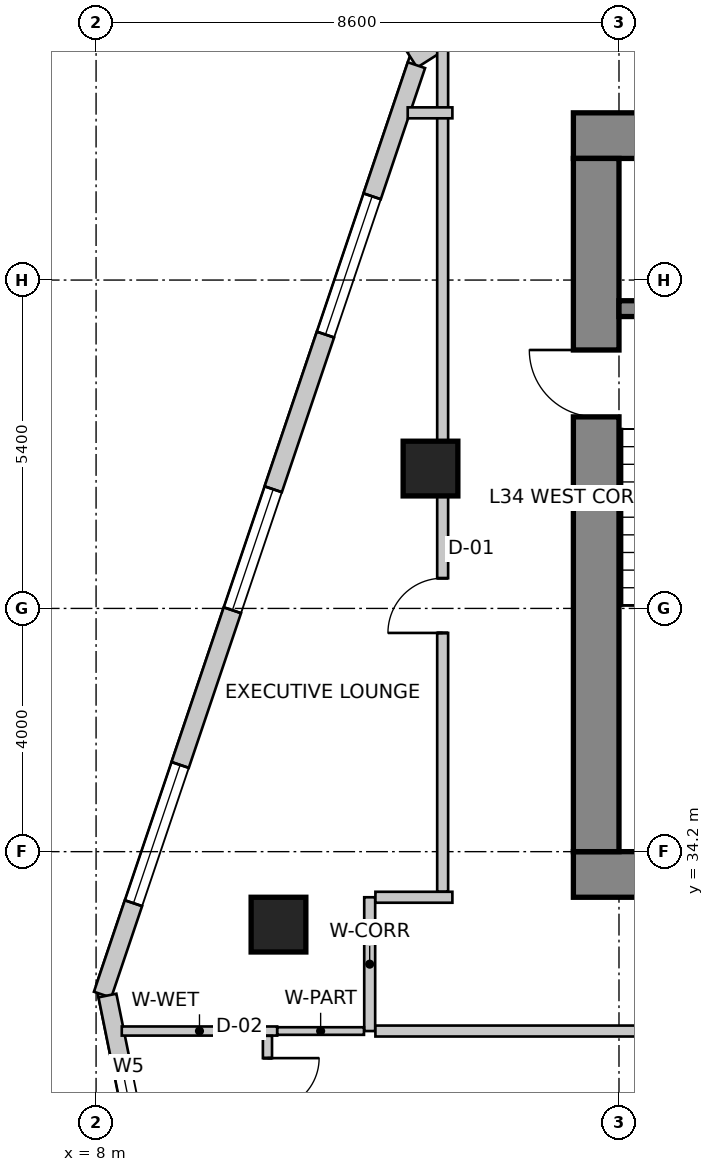
"""IFC4 building model, lengths in metres.
Left out: names, types, materials, properties, quantities, classifications, styles, units other than length and angle.
Written with IfcOpenShell. Run it as: python <this file> out.ifc"""

import sys

from ifc_helpers import new_model, si_unit, direction, frame, frame_2d, origin, origin_2d, place, context, subcontext, project, spatial, rectangle, extrude, source, transform, mapped, element, fill, save


model = new_model("IFC4")
c1 = context("Model", 3, precision=1e-05, world=origin(), true_north=direction((0.0, 1.0)))
c2 = subcontext(c1, "Body", "Model", "MODEL_VIEW")
j1 = project(units=[si_unit("LENGTHUNIT", "METRE"), si_unit("PLANEANGLEUNIT", "RADIAN")], contexts=[c1])
p1 = place(None, origin())
s1 = spatial("IfcSite", under=j1, at=p1, CompositionType="ELEMENT")
p2 = place(p1, origin())
s2 = spatial("IfcBuilding", under=s1, at=p2, CompositionType="ELEMENT")
p3 = place(p2, frame((0.0, 0.0, 139.4)))
s3 = spatial("IfcBuildingStorey", under=s2, at=p3, CompositionType="ELEMENT", Elevation=139.4)
p4 = place(p3, frame((15.85, 45.975, 0.0), z_axis=(0.0, 0.0, 1.0), x_axis=(1.0, 0.0, 0.0)))
e1 = element("IfcWall", 1, at=p4, inside=s3, PredefinedType="SHEAR", context=c2, shape_type="SweptSolid", body=[
    extrude(rectangle(XDim=15.9, YDim=0.75, at=frame_2d((7.95, 0.0))), origin(), (0.0, 0.0, 1.0), 3.6),
])
p5 = place(p3, frame((15.85, 33.825, 0.0), z_axis=(0.0, 0.0, 1.0), x_axis=(1.0, 0.0, 0.0)))
e2 = element("IfcWall", 2, at=p5, inside=s3, PredefinedType="SHEAR", context=c2, shape_type="SweptSolid", body=[
    extrude(rectangle(XDim=15.9, YDim=0.75, at=frame_2d((7.95, 0.0))), origin(), (0.0, 0.0, 1.0), 3.6),
])
m1 = source(origin(), c2, "Body", "SweptSolid", [
    extrude(rectangle(XDim=1.3, YDim=2.15, at=frame_2d((0.65, 1.075))), frame((0.0, 0.385, 0.0), z_axis=(0.0, -1.0, 0.0), x_axis=(1.0, 0.0, 0.0)), (0.0, 0.0, 1.0), 0.77),
])
p6 = place(p5, frame((10.08, 0.0, 0.0)))
e3 = element("IfcOpeningElement", 3, at=p6, cuts=e2, PredefinedType="OPENING", context=c2, shape_type="MappedRepresentation", body=[
    mapped(m1, transform((0.0, 0.0, 0.0), scale=1.0)),
])
p7 = place(p3, frame((16.225, 34.2, 0.0), z_axis=(0.0, 0.0, 1.0), x_axis=(0.0, 1.0, 0.0)))
e4 = element("IfcWall", 4, at=p7, inside=s3, PredefinedType="SHEAR", context=c2, shape_type="SweptSolid", body=[
    extrude(rectangle(XDim=11.4, YDim=0.75, at=frame_2d((5.7, 0.0))), origin(), (0.0, 0.0, 1.0), 3.6),
])
m2 = source(origin(), c2, "Body", "SweptSolid", [
    extrude(rectangle(XDim=1.1, YDim=2.15, at=frame_2d((0.55, 1.075))), frame((0.0, 0.385, 0.0), z_axis=(0.0, -1.0, 0.0), x_axis=(1.0, 0.0, 0.0)), (0.0, 0.0, 1.0), 0.77),
])
p8 = place(p7, frame((7.15, 0.0, 0.0)))
e5 = element("IfcOpeningElement", 5, at=p8, cuts=e4, PredefinedType="OPENING", context=c2, shape_type="MappedRepresentation", body=[
    mapped(m2, transform((0.0, 0.0, 0.0), scale=1.0)),
])
p9 = place(p3, frame((16.6, 43.13, 0.0), z_axis=(0.0, 0.0, 1.0), x_axis=(1.0, 0.0, 0.0)))
e6 = element("IfcWall", 6, at=p9, inside=s3, PredefinedType="SHEAR", context=c2, shape_type="SweptSolid", body=[
    extrude(rectangle(XDim=3.5, YDim=0.26, at=frame_2d((1.75, 0.0))), origin(), (0.0, 0.0, 1.0), 3.6),
])
m3 = source(origin(), c2, "Body", "SweptSolid", [
    extrude(rectangle(XDim=0.9, YDim=0.9, at=origin_2d()), origin(), (0.0, 0.0, 1.0), 3.6),
])
for number, where, z_axis, x_axis in (
    (7, (11.0, 33.0, 0.0), (0.0, 0.0, 1.0), (1.0, 0.0, 0.0)),
    (8, (13.5, 40.5, 0.0), (0.0, 0.0, 1.0), (1.0, 0.0, 0.0)),
):
    element("IfcColumn", number, at=place(p3, frame(where, z_axis=z_axis, x_axis=x_axis)), inside=s3, PredefinedType="COLUMN", context=c2, shape_type="MappedRepresentation", body=[
        mapped(m3, transform((0.0, 0.0, 0.0), scale=1.0)),
    ])
p10 = place(p3, frame((21.875, 52.742, 0.0), z_axis=(0.0, 0.0, 1.0), x_axis=(-0.843662465249, -0.536873956092, 0.0)))
e9 = element("IfcWall", 9, at=p10, inside=s3, PredefinedType="SOLIDWALL", context=c2, shape_type="SweptSolid", body=[
    extrude(rectangle(XDim=10.284, YDim=0.3, at=frame_2d((5.142, 0.0))), origin(), (0.0, 0.0, 1.0), 3.35),
])
m4 = source(origin(), c2, "Body", "SweptSolid", [
    extrude(rectangle(XDim=2.1, YDim=2.0, at=frame_2d((1.05, 1.0))), frame((0.0, 0.16, 0.0), z_axis=(0.0, -1.0, 0.0), x_axis=(1.0, 0.0, 0.0)), (0.0, 0.0, 1.0), 0.32),
])
p11 = place(p10, frame((2.806, 0.0, 0.85)))
e10 = element("IfcOpeningElement", 10, at=p11, cuts=e9, PredefinedType="OPENING", context=c2, shape_type="MappedRepresentation", body=[
    mapped(m4, transform((0.0, 0.0, 0.0), scale=1.0)),
])
m5 = source(origin(), c2, "Body", "SweptSolid", [
    extrude(rectangle(XDim=1.2, YDim=1.6, at=frame_2d((0.6, 0.8))), frame((0.0, 0.16, 0.0), z_axis=(0.0, -1.0, 0.0), x_axis=(1.0, 0.0, 0.0)), (0.0, 0.0, 1.0), 0.32),
])
p12 = place(p10, frame((8.087, 0.0, 0.85)))
e11 = element("IfcOpeningElement", 11, at=p12, cuts=e9, PredefinedType="OPENING", context=c2, shape_type="MappedRepresentation", body=[
    mapped(m5, transform((0.0, 0.0, 0.0), scale=1.0)),
])
p13 = place(p3, frame((13.269, 47.134, 0.0), z_axis=(0.0, 0.0, 1.0), x_axis=(-0.319929773322, -0.947441259468, 0.0)))
e12 = element("IfcWall", 12, at=p13, inside=s3, PredefinedType="SOLIDWALL", context=c2, shape_type="SweptSolid", body=[
    extrude(rectangle(XDim=16.134, YDim=0.3, at=frame_2d((8.067, 0.0))), origin(), (0.0, 0.0, 1.0), 3.35),
])
m6 = source(origin(), c2, "Body", "SweptSolid", [
    extrude(rectangle(XDim=2.4, YDim=2.2, at=frame_2d((1.2, 1.1))), frame((0.0, 0.16, 0.0), z_axis=(0.0, -1.0, 0.0), x_axis=(1.0, 0.0, 0.0)), (0.0, 0.0, 1.0), 0.32),
])
p14 = place(p13, frame((2.276, 0.0, 0.85)))
e13 = element("IfcOpeningElement", 13, at=p14, cuts=e12, PredefinedType="OPENING", context=c2, shape_type="MappedRepresentation", body=[
    mapped(m6, transform((0.0, 0.0, 0.0), scale=1.0)),
])
p15 = place(p13, frame((7.361, 0.0, 0.85)))
e14 = element("IfcOpeningElement", 14, at=p15, cuts=e12, PredefinedType="OPENING", context=c2, shape_type="MappedRepresentation", body=[
    mapped(m4, transform((0.0, 0.0, 0.0), scale=1.0)),
])
p16 = place(p13, frame((12.146, 0.0, 0.85)))
e15 = element("IfcOpeningElement", 15, at=p16, cuts=e12, PredefinedType="OPENING", context=c2, shape_type="MappedRepresentation", body=[
    mapped(m6, transform((0.0, 0.0, 0.0), scale=1.0)),
])
p17 = place(p3, frame((8.187, 31.834, 0.0), z_axis=(0.0, 0.0, 1.0), x_axis=(0.198869838988, -0.980025911464, 0.0)))
e16 = element("IfcWall", 16, at=p17, inside=s3, PredefinedType="SOLIDWALL", context=c2, shape_type="SweptSolid", body=[
    extrude(rectangle(XDim=16.363, YDim=0.3, at=frame_2d((8.182, 0.0))), origin(), (0.0, 0.0, 1.0), 3.35),
])
p18 = place(p17, frame((1.131, 0.0, 0.85)))
e17 = element("IfcOpeningElement", 17, at=p18, cuts=e16, PredefinedType="OPENING", context=c2, shape_type="MappedRepresentation", body=[
    mapped(m5, transform((0.0, 0.0, 0.0), scale=1.0)),
])
p19 = place(p17, frame((4.38, 0.0, 0.85)))
e18 = element("IfcOpeningElement", 18, at=p19, cuts=e16, PredefinedType="OPENING", context=c2, shape_type="MappedRepresentation", body=[
    mapped(m4, transform((0.0, 0.0, 0.0), scale=1.0)),
])
p20 = place(p17, frame((8.539, 0.0, 0.85)))
e19 = element("IfcOpeningElement", 19, at=p20, cuts=e16, PredefinedType="OPENING", context=c2, shape_type="MappedRepresentation", body=[
    mapped(m5, transform((0.0, 0.0, 0.0), scale=1.0)),
])
p21 = place(p17, frame((12.212, 0.0, 0.85)))
e20 = element("IfcOpeningElement", 20, at=p21, cuts=e16, PredefinedType="OPENING", context=c2, shape_type="MappedRepresentation", body=[
    mapped(m4, transform((0.0, 0.0, 0.0), scale=1.0)),
])
p22 = place(p3, frame((12.5, 31.25, 0.0), z_axis=(0.0, 0.0, 1.0), x_axis=(0.0, 1.0, 0.0)))
e21 = element("IfcWall", 21, at=p22, inside=s3, PredefinedType="PARTITIONING", context=c2, shape_type="SweptSolid", body=[
    extrude(rectangle(XDim=2.2, YDim=0.18, at=frame_2d((1.1, 0.0))), origin(), (0.0, 0.0, 1.0), 3.019),
])
p23 = place(p3, frame((12.594, 33.45, 0.0), z_axis=(0.0, 0.0, 1.0), x_axis=(1.0, 0.0, 0.0)))
e22 = element("IfcWall", 22, at=p23, inside=s3, PredefinedType="PARTITIONING", context=c2, shape_type="SweptSolid", body=[
    extrude(rectangle(XDim=1.266, YDim=0.18, at=frame_2d((0.633, 0.0))), origin(), (0.0, 0.0, 1.0), 3.35),
])
p24 = place(p3, frame((17.96, 31.25, 0.0), z_axis=(0.0, 0.0, 1.0), x_axis=(-1.0, 0.0, 0.0)))
e23 = element("IfcWall", 23, at=p24, inside=s3, PredefinedType="PARTITIONING", context=c2, shape_type="SweptSolid", body=[
    extrude(rectangle(XDim=5.366, YDim=0.18, at=frame_2d((2.683, 0.0))), origin(), (0.0, 0.0, 1.0), 3.019),
])
p25 = place(p3, frame((13.7, 33.544, 0.0), z_axis=(0.0, 0.0, 1.0), x_axis=(0.0, 1.0, 0.0)))
e24 = element("IfcWall", 24, at=p25, inside=s3, PredefinedType="PARTITIONING", context=c2, shape_type="SweptSolid", body=[
    extrude(rectangle(XDim=13.86, YDim=0.18, at=frame_2d((6.93, 0.0))), origin(), (0.0, 0.0, 1.0), 2.492),
])
m7 = source(origin(), c2, "Body", "SweptSolid", [
    extrude(rectangle(XDim=0.9, YDim=2.15, at=frame_2d((0.45, 1.075))), frame((0.0, 0.1, 0.0), z_axis=(0.0, -1.0, 0.0), x_axis=(1.0, 0.0, 0.0)), (0.0, 0.0, 1.0), 0.2),
])
p26 = place(p25, frame((4.253, 0.0, 0.0)))
e25 = element("IfcOpeningElement", 25, at=p26, cuts=e24, PredefinedType="OPENING", context=c2, shape_type="MappedRepresentation", body=[
    mapped(m7, transform((0.0, 0.0, 0.0), scale=1.0)),
])
p27 = place(p3, frame((13.86, 46.35, 0.0), z_axis=(0.0, 0.0, 1.0), x_axis=(-1.0, 0.0, 0.0)))
e26 = element("IfcWall", 26, at=p27, inside=s3, PredefinedType="PARTITIONING", context=c2, shape_type="SweptSolid", body=[
    extrude(rectangle(XDim=0.735, YDim=0.18, at=frame_2d((0.367, 0.0))), origin(), (0.0, 0.0, 1.0), 3.35),
])
p28 = place(p3, frame((10.979, 31.25, 0.0), z_axis=(0.0, 0.0, 1.0), x_axis=(-1.0, 0.0, 0.0)))
e27 = element("IfcWall", 27, at=p28, inside=s3, PredefinedType="PARTITIONING", context=c2, shape_type="SweptSolid", body=[
    extrude(rectangle(XDim=2.556, YDim=0.15, at=frame_2d((1.278, 0.0))), origin(), (0.0, 0.0, 1.0), 2.492),
])
p29 = place(p3, frame((12.406, 31.25, 0.0), z_axis=(0.0, 0.0, 1.0), x_axis=(-1.0, 0.0, 0.0)))
e28 = element("IfcWall", 28, at=p29, inside=s3, PredefinedType="PARTITIONING", context=c2, shape_type="SweptSolid", body=[
    extrude(rectangle(XDim=1.426, YDim=0.125, at=frame_2d((0.713, 0.0))), origin(), (0.0, 0.0, 1.0), 2.492),
])
p30 = place(p3, frame((10.819, 31.171, 0.0), z_axis=(0.0, 0.0, 1.0), x_axis=(0.0, -1.0, 0.0)))
e29 = element("IfcWall", 29, at=p30, inside=s3, PredefinedType="PARTITIONING", context=c2, shape_type="SweptSolid", body=[
    extrude(rectangle(XDim=2.101, YDim=0.15, at=frame_2d((1.05, 0.0))), origin(), (0.0, 0.0, 1.0), 2.492),
])
m8 = source(origin(), c2, "Body", "SweptSolid", [
    extrude(rectangle(XDim=0.85, YDim=2.15, at=frame_2d((0.425, 1.075))), frame((0.0, 0.085, 0.0), z_axis=(0.0, -1.0, 0.0), x_axis=(1.0, 0.0, 0.0)), (0.0, 0.0, 1.0), 0.17),
])
p31 = place(p30, frame((0.366, 0.0, 0.0)))
e30 = element("IfcOpeningElement", 30, at=p31, cuts=e29, PredefinedType="OPENING", context=c2, shape_type="MappedRepresentation", body=[
    mapped(m8, transform((0.0, 0.0, 0.0), scale=1.0)),
])
m9 = source(origin(), c2, "Body", "SweptSolid", [
    extrude(rectangle(XDim=2.4, YDim=2.2, at=frame_2d((1.2, 1.1))), frame((0.0, -0.015, 0.0), z_axis=(0.0, -1.0, 0.0), x_axis=(1.0, 0.0, 0.0)), (0.0, 0.0, 1.0), 0.06),
])
p32 = place(p14, origin())
e31 = element("IfcWindow", 31, at=p32, inside=s3, PartitioningType="SINGLE_PANEL", PredefinedType="WINDOW", context=c2, shape_type="MappedRepresentation", body=[
    mapped(m9, transform((0.0, 0.0, 0.0), scale=1.0)),
])
fill(e13, e31)
m10 = source(origin(), c2, "Body", "SweptSolid", [
    extrude(rectangle(XDim=2.1, YDim=2.0, at=frame_2d((1.05, 1.0))), frame((0.0, -0.015, 0.0), z_axis=(0.0, -1.0, 0.0), x_axis=(1.0, 0.0, 0.0)), (0.0, 0.0, 1.0), 0.06),
])
p33 = place(p15, origin())
e32 = element("IfcWindow", 32, at=p33, inside=s3, PartitioningType="SINGLE_PANEL", PredefinedType="WINDOW", context=c2, shape_type="MappedRepresentation", body=[
    mapped(m10, transform((0.0, 0.0, 0.0), scale=1.0)),
])
fill(e14, e32)
p34 = place(p16, origin())
e33 = element("IfcWindow", 33, at=p34, inside=s3, PartitioningType="SINGLE_PANEL", PredefinedType="WINDOW", context=c2, shape_type="MappedRepresentation", body=[
    mapped(m9, transform((0.0, 0.0, 0.0), scale=1.0)),
])
fill(e15, e33)
m11 = source(origin(), c2, "Body", "SweptSolid", [
    extrude(rectangle(XDim=1.2, YDim=1.6, at=frame_2d((0.6, 0.8))), frame((0.0, -0.015, 0.0), z_axis=(0.0, -1.0, 0.0), x_axis=(1.0, 0.0, 0.0)), (0.0, 0.0, 1.0), 0.06),
])
p35 = place(p18, origin())
e34 = element("IfcWindow", 34, at=p35, inside=s3, PartitioningType="SINGLE_PANEL", PredefinedType="WINDOW", context=c2, shape_type="MappedRepresentation", body=[
    mapped(m11, transform((0.0, 0.0, 0.0), scale=1.0)),
])
fill(e17, e34)
m12 = source(origin(), c2, "Body", "SweptSolid", [
    extrude(rectangle(XDim=1.1, YDim=2.15, at=frame_2d((0.55, 1.075))), frame((0.0, 0.025, 0.0), z_axis=(0.0, -1.0, 0.0), x_axis=(1.0, 0.0, 0.0)), (0.0, 0.0, 1.0), 0.05),
])
p36 = place(p8, origin())
e35 = element("IfcDoor", 35, at=p36, inside=s3, OperationType="SINGLE_SWING_RIGHT", PredefinedType="DOOR", context=c2, shape_type="MappedRepresentation", body=[
    mapped(m12, transform((0.0, 0.0, 0.0), scale=1.0)),
])
fill(e5, e35)
m13 = source(origin(), c2, "Body", "SweptSolid", [
    extrude(rectangle(XDim=0.9, YDim=2.15, at=frame_2d((0.45, 1.075))), frame((0.0, 0.025, 0.0), z_axis=(0.0, -1.0, 0.0), x_axis=(1.0, 0.0, 0.0)), (0.0, 0.0, 1.0), 0.05),
])
p37 = place(p26, origin())
e36 = element("IfcDoor", 36, at=p37, inside=s3, OperationType="SINGLE_SWING_LEFT", PredefinedType="DOOR", context=c2, shape_type="MappedRepresentation", body=[
    mapped(m13, transform((0.0, 0.0, 0.0), scale=1.0)),
])
fill(e25, e36)
m14 = source(origin(), c2, "Body", "SweptSolid", [
    extrude(rectangle(XDim=0.85, YDim=2.15, at=frame_2d((0.425, 1.075))), frame((0.0, 0.025, 0.0), z_axis=(0.0, -1.0, 0.0), x_axis=(1.0, 0.0, 0.0)), (0.0, 0.0, 1.0), 0.05),
])
p38 = place(p31, origin())
e37 = element("IfcDoor", 37, at=p38, inside=s3, OperationType="SINGLE_SWING_LEFT", PredefinedType="DOOR", context=c2, shape_type="MappedRepresentation", body=[
    mapped(m14, transform((0.0, 0.0, 0.0), scale=1.0)),
])
fill(e30, e37)
save(model, sys.argv[1])
